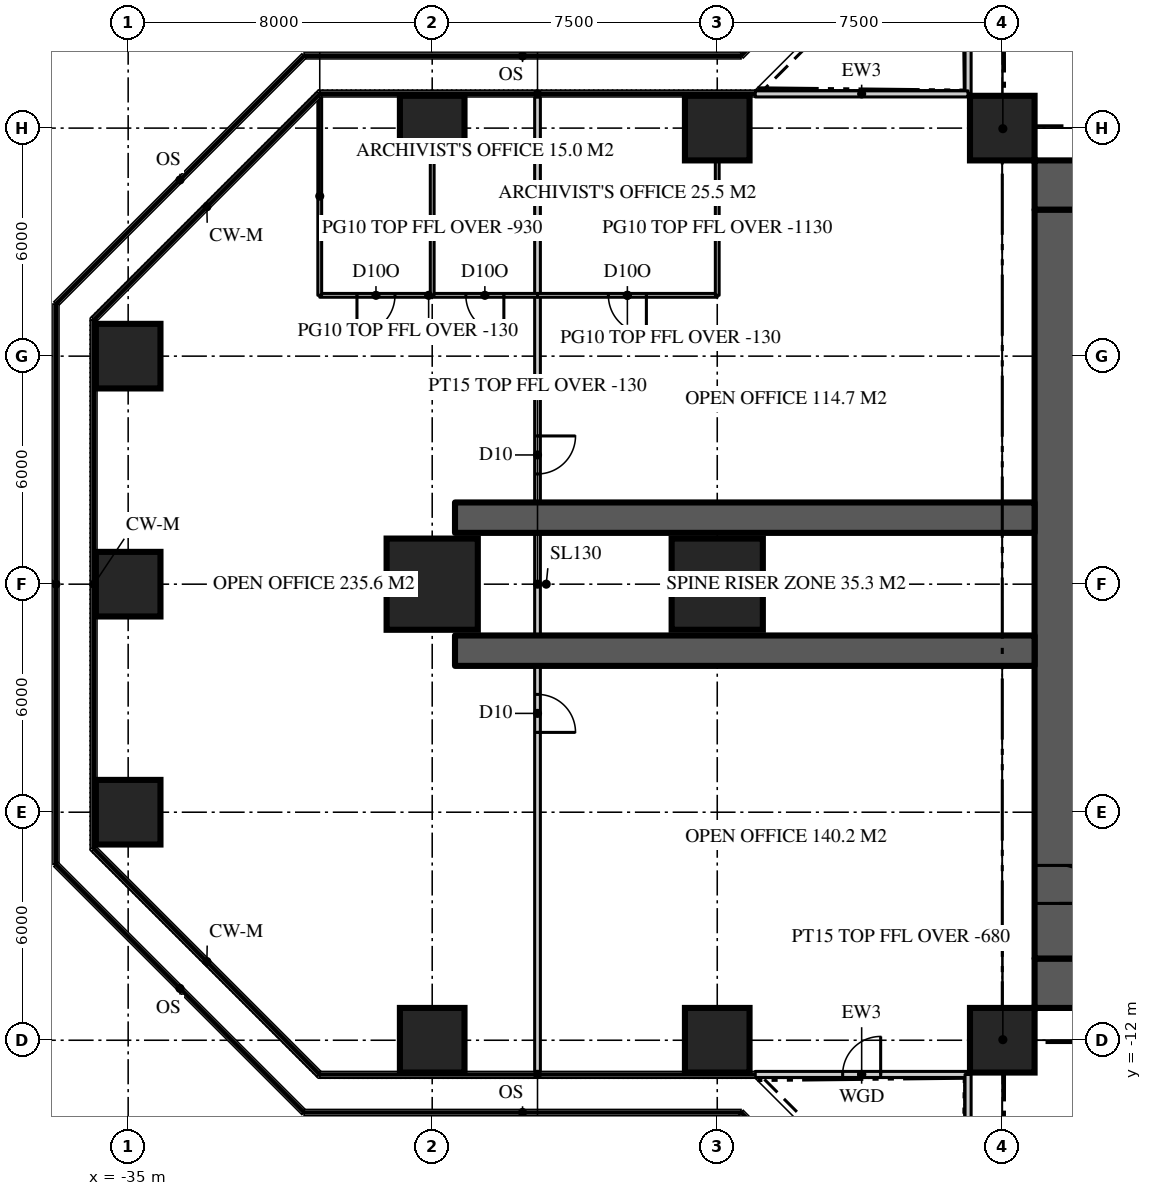
"""IFC4 building model, lengths in metres.
Left out: names, types, materials, properties, quantities, classifications, styles, units other than length and angle.
Written with IfcOpenShell. Run it as: python <this file> out.ifc"""

import sys

from ifc_helpers import new_model, si_unit, direction, frame, frame_2d, origin, origin_2d, place, context, subcontext, project, spatial, rectangle, extrude, element, fill, save


model = new_model("IFC4")
c1 = context("Model", 3, precision=1e-05, world=origin(), true_north=direction((0.0, 1.0)))
c2 = subcontext(c1, "Body", "Model", "MODEL_VIEW")
j1 = project(units=[si_unit("LENGTHUNIT", "METRE"), si_unit("PLANEANGLEUNIT", "RADIAN")], contexts=[c1])
p1 = place(None, origin())
s1 = spatial("IfcSite", under=j1, at=p1, CompositionType="ELEMENT")
p2 = place(p1, origin())
s2 = spatial("IfcBuilding", under=s1, at=p2, CompositionType="ELEMENT")
p3 = place(p2, frame((0.0, 0.0, 167.1)))
s3 = spatial("IfcBuildingStorey", under=s2, at=p3, CompositionType="ELEMENT", Elevation=167.1)
p4 = place(p3, frame((-11.15, 10.5, 0.0), z_axis=(0.0, 0.0, 1.0), x_axis=(1.0, 0.0, 0.0)))
e1 = element("IfcWall", 1, at=p4, inside=s3, PredefinedType="SHEAR", context=c2, shape_type="SweptSolid", body=[
    extrude(rectangle(XDim=22.3, YDim=1.3, at=frame_2d((11.15, 0.0))), origin(), (0.0, 0.0, 1.0), 3.9),
])
p5 = place(p4, frame((4.25, 0.0, 0.0)))
e2 = element("IfcOpeningElement", 2, at=p5, cuts=e1, PredefinedType="OPENING", context=c2, shape_type="SweptSolid", body=[
    extrude(rectangle(XDim=1.8, YDim=2.2, at=frame_2d((0.9, 1.1))), frame((0.0, 0.66, 0.0), z_axis=(0.0, -1.0, 0.0), x_axis=(1.0, 0.0, 0.0)), (0.0, 0.0, 1.0), 1.32),
])
p6 = place(p4, frame((16.25, 0.0, 0.0)))
e3 = element("IfcOpeningElement", 3, at=p6, cuts=e1, PredefinedType="OPENING", context=c2, shape_type="SweptSolid", body=[
    extrude(rectangle(XDim=1.8, YDim=2.2, at=frame_2d((0.9, 1.1))), frame((0.0, 0.66, 0.0), z_axis=(0.0, -1.0, 0.0), x_axis=(1.0, 0.0, 0.0)), (0.0, 0.0, 1.0), 1.32),
])
p7 = place(p3, frame((11.15, -10.5, 0.0), z_axis=(0.0, 0.0, 1.0), x_axis=(-1.0, 0.0, 0.0)))
e4 = element("IfcWall", 4, at=p7, inside=s3, PredefinedType="SHEAR", context=c2, shape_type="SweptSolid", body=[
    extrude(rectangle(XDim=22.3, YDim=1.3, at=frame_2d((11.15, 0.0))), origin(), (0.0, 0.0, 1.0), 3.9),
])
p8 = place(p7, frame((16.25, 0.0, 0.0)))
e5 = element("IfcOpeningElement", 5, at=p8, cuts=e4, PredefinedType="OPENING", context=c2, shape_type="SweptSolid", body=[
    extrude(rectangle(XDim=1.8, YDim=2.2, at=frame_2d((0.9, 1.1))), frame((0.0, 0.66, 0.0), z_axis=(0.0, -1.0, 0.0), x_axis=(1.0, 0.0, 0.0)), (0.0, 0.0, 1.0), 1.32),
])
p9 = place(p7, frame((4.25, 0.0, 0.0)))
e6 = element("IfcOpeningElement", 6, at=p9, cuts=e4, PredefinedType="OPENING", context=c2, shape_type="SweptSolid", body=[
    extrude(rectangle(XDim=1.8, YDim=2.2, at=frame_2d((0.9, 1.1))), frame((0.0, 0.66, 0.0), z_axis=(0.0, -1.0, 0.0), x_axis=(1.0, 0.0, 0.0)), (0.0, 0.0, 1.0), 1.32),
])
p10 = place(p3, frame((-10.5, 9.85, 0.0), z_axis=(0.0, 0.0, 1.0), x_axis=(0.0, -1.0, 0.0)))
e7 = element("IfcWall", 7, at=p10, inside=s3, PredefinedType="SHEAR", context=c2, shape_type="SweptSolid", body=[
    extrude(rectangle(XDim=19.7, YDim=1.3, at=frame_2d((9.85, 0.0))), origin(), (0.0, 0.0, 1.0), 3.9),
])
p11 = place(p10, frame((17.25, 0.0, 0.0)))
e8 = element("IfcOpeningElement", 8, at=p11, cuts=e7, PredefinedType="OPENING", context=c2, shape_type="SweptSolid", body=[
    extrude(rectangle(XDim=1.0, YDim=2.2, at=frame_2d((0.5, 1.1))), frame((0.0, 0.66, 0.0), z_axis=(0.0, -1.0, 0.0), x_axis=(1.0, 0.0, 0.0)), (0.0, 0.0, 1.0), 1.32),
])
for number, where, z_axis, x_axis in (
    (9, (-11.15, 1.75, 0.0), (0.0, 0.0, 1.0), (-1.0, 0.0, 0.0)),
    (10, (-11.15, -1.75, 0.0), (0.0, 0.0, 1.0), (-1.0, 0.0, 0.0)),
):
    element("IfcWall", number, at=place(p3, frame(where, z_axis=z_axis, x_axis=x_axis)), inside=s3, PredefinedType="SHEAR", context=c2, shape_type="SweptSolid", body=[
        extrude(rectangle(XDim=15.25, YDim=0.8, at=frame_2d((7.625, 0.0))), origin(), (0.0, 0.0, 1.0), 3.9),
    ])
for number, where, z_axis, x_axis in (
    (11, (-27.0, -12.0, 0.0), (0.0, 0.0, 1.0), (1.0, 0.0, 0.0)),
    (12, (-19.5, -12.0, 0.0), (0.0, 0.0, 1.0), (1.0, 0.0, 0.0)),
    (13, (-12.0, -12.0, 0.0), (0.0, 0.0, 1.0), (1.0, 0.0, 0.0)),
    (14, (-35.0, -6.0, 0.0), (0.0, 0.0, 1.0), (1.0, 0.0, 0.0)),
    (15, (-35.0, 0.0, 0.0), (0.0, 0.0, 1.0), (1.0, 0.0, 0.0)),
):
    element("IfcColumn", number, at=place(p3, frame(where, z_axis=z_axis, x_axis=x_axis)), inside=s3, PredefinedType="COLUMN", context=c2, shape_type="SweptSolid", body=[
        extrude(rectangle(XDim=1.7, YDim=1.7, at=origin_2d()), origin(), (0.0, 0.0, 1.0), 3.9),
    ])
for number, where, z_axis, x_axis in (
    (16, (-27.0, 0.0, 0.0), (0.0, 0.0, 1.0), (1.0, 0.0, 0.0)),
    (17, (-19.5, 0.0, 0.0), (0.0, 0.0, 1.0), (1.0, 0.0, 0.0)),
):
    element("IfcColumn", number, at=place(p3, frame(where, z_axis=z_axis, x_axis=x_axis)), inside=s3, PredefinedType="COLUMN", context=c2, shape_type="SweptSolid", body=[
        extrude(rectangle(XDim=2.4, YDim=2.4, at=origin_2d()), origin(), (0.0, 0.0, 1.0), 3.9),
    ])
for number, where, z_axis, x_axis in (
    (18, (-35.0, 6.0, 0.0), (0.0, 0.0, 1.0), (1.0, 0.0, 0.0)),
    (19, (-27.0, 12.0, 0.0), (0.0, 0.0, 1.0), (1.0, 0.0, 0.0)),
    (20, (-19.5, 12.0, 0.0), (0.0, 0.0, 1.0), (1.0, 0.0, 0.0)),
    (21, (-12.0, 12.0, 0.0), (0.0, 0.0, 1.0), (1.0, 0.0, 0.0)),
):
    element("IfcColumn", number, at=place(p3, frame(where, z_axis=z_axis, x_axis=x_axis)), inside=s3, PredefinedType="COLUMN", context=c2, shape_type="SweptSolid", body=[
        extrude(rectangle(XDim=1.7, YDim=1.7, at=origin_2d()), origin(), (0.0, 0.0, 1.0), 3.9),
    ])
p12 = place(p3, frame((-12.9, 18.5, 0.0), z_axis=(0.0, 0.0, 1.0), x_axis=(0.0, -1.0, 0.0)))
e22 = element("IfcWall", 22, at=p12, inside=s3, PredefinedType="SOLIDWALL", context=c2, shape_type="SweptSolid", body=[
    extrude(rectangle(XDim=5.6, YDim=0.16, at=frame_2d((2.8, 0.0))), origin(), (0.0, 0.0, 1.0), 3.77),
])
p13 = place(p12, frame((2.3, 0.0, 0.0)))
e23 = element("IfcOpeningElement", 23, at=p13, cuts=e22, PredefinedType="OPENING", context=c2, shape_type="SweptSolid", body=[
    extrude(rectangle(XDim=1.0, YDim=2.2, at=frame_2d((0.5, 1.1))), frame((0.0, 0.09, 0.0), z_axis=(0.0, -1.0, 0.0), x_axis=(1.0, 0.0, 0.0)), (0.0, 0.0, 1.0), 0.18),
])
p14 = place(p3, frame((-12.9, 12.9, 0.0), z_axis=(0.0, 0.0, 1.0), x_axis=(-1.0, 0.0, 0.0)))
e24 = element("IfcWall", 24, at=p14, inside=s3, PredefinedType="SOLIDWALL", context=c2, shape_type="SweptSolid", body=[
    extrude(rectangle(XDim=5.6, YDim=0.16, at=frame_2d((2.8, 0.0))), origin(), (0.0, 0.0, 1.0), 3.77),
])
p15 = place(p3, frame((-18.5, -12.9, 0.0), z_axis=(0.0, 0.0, 1.0), x_axis=(1.0, 0.0, 0.0)))
e25 = element("IfcWall", 25, at=p15, inside=s3, PredefinedType="SOLIDWALL", context=c2, shape_type="SweptSolid", body=[
    extrude(rectangle(XDim=5.6, YDim=0.16, at=frame_2d((2.8, 0.0))), origin(), (0.0, 0.0, 1.0), 3.77),
])
p16 = place(p15, frame((2.3, 0.0, 0.0)))
e26 = element("IfcOpeningElement", 26, at=p16, cuts=e25, PredefinedType="OPENING", context=c2, shape_type="SweptSolid", body=[
    extrude(rectangle(XDim=1.0, YDim=2.2, at=frame_2d((0.5, 1.1))), frame((0.0, 0.09, 0.0), z_axis=(0.0, -1.0, 0.0), x_axis=(1.0, 0.0, 0.0)), (0.0, 0.0, 1.0), 0.18),
])
p17 = place(p3, frame((-12.9, -12.9, 0.0), z_axis=(0.0, 0.0, 1.0), x_axis=(0.0, -1.0, 0.0)))
e27 = element("IfcWall", 27, at=p17, inside=s3, PredefinedType="SOLIDWALL", context=c2, shape_type="SweptSolid", body=[
    extrude(rectangle(XDim=5.6, YDim=0.16, at=frame_2d((2.8, 0.0))), origin(), (0.0, 0.0, 1.0), 3.77),
])
p18 = place(p3, frame((-24.229, 12.82, 0.0), z_axis=(0.0, 0.0, 1.0), x_axis=(0.0, -1.0, 0.0)))
e28 = element("IfcWall", 28, at=p18, inside=s3, PredefinedType="PARTITIONING", context=c2, shape_type="SweptSolid", body=[
    extrude(rectangle(XDim=25.64, YDim=0.15, at=frame_2d((12.82, 0.0))), origin(), (0.0, 0.0, 1.0), 3.77),
])
p19 = place(p18, frame((15.72, 0.0, 0.0)))
e29 = element("IfcOpeningElement", 29, at=p19, cuts=e28, PredefinedType="OPENING", context=c2, shape_type="SweptSolid", body=[
    extrude(rectangle(XDim=1.0, YDim=2.2, at=frame_2d((0.5, 1.1))), frame((0.0, 0.085, 0.0), z_axis=(0.0, -1.0, 0.0), x_axis=(1.0, 0.0, 0.0)), (0.0, 0.0, 1.0), 0.17),
])
p20 = place(p18, frame((8.92, 0.0, 0.0)))
e30 = element("IfcOpeningElement", 30, at=p20, cuts=e28, PredefinedType="OPENING", context=c2, shape_type="SweptSolid", body=[
    extrude(rectangle(XDim=1.0, YDim=2.2, at=frame_2d((0.5, 1.1))), frame((0.0, 0.085, 0.0), z_axis=(0.0, -1.0, 0.0), x_axis=(1.0, 0.0, 0.0)), (0.0, 0.0, 1.0), 0.17),
])
p21 = place(p3, frame((-19.5, 7.6, 0.0), z_axis=(0.0, 0.0, 1.0), x_axis=(-1.0, 0.0, 0.0)))
e31 = element("IfcWall", 31, at=p21, inside=s3, PredefinedType="PARTITIONING", context=c2, shape_type="SweptSolid", body=[
    extrude(rectangle(XDim=4.729, YDim=0.1, at=frame_2d((2.365, 0.0))), origin(), (0.0, 0.0, 1.0), 3.77),
])
p22 = place(p21, frame((1.865, 0.0, 0.0)))
e32 = element("IfcOpeningElement", 32, at=p22, cuts=e31, PredefinedType="OPENING", context=c2, shape_type="SweptSolid", body=[
    extrude(rectangle(XDim=1.0, YDim=2.2, at=frame_2d((0.5, 1.1))), frame((0.0, 0.06, 0.0), z_axis=(0.0, -1.0, 0.0), x_axis=(1.0, 0.0, 0.0)), (0.0, 0.0, 1.0), 0.12),
])
p23 = place(p3, frame((-24.229, 7.6, 0.0), z_axis=(0.0, 0.0, 1.0), x_axis=(-1.0, 0.0, 0.0)))
e33 = element("IfcWall", 33, at=p23, inside=s3, PredefinedType="PARTITIONING", context=c2, shape_type="SweptSolid", body=[
    extrude(rectangle(XDim=5.73, YDim=0.1, at=frame_2d((2.865, 0.0))), origin(), (0.0, 0.0, 1.0), 3.77),
])
p24 = place(p23, frame((0.885, 0.0, 0.0)))
e34 = element("IfcOpeningElement", 34, at=p24, cuts=e33, PredefinedType="OPENING", context=c2, shape_type="SweptSolid", body=[
    extrude(rectangle(XDim=1.0, YDim=2.2, at=frame_2d((0.5, 1.1))), frame((0.0, 0.06, 0.0), z_axis=(0.0, -1.0, 0.0), x_axis=(1.0, 0.0, 0.0)), (0.0, 0.0, 1.0), 0.12),
])
p25 = place(p23, frame((3.75, 0.0, 0.0)))
e35 = element("IfcOpeningElement", 35, at=p25, cuts=e33, PredefinedType="OPENING", context=c2, shape_type="SweptSolid", body=[
    extrude(rectangle(XDim=1.0, YDim=2.2, at=frame_2d((0.5, 1.1))), frame((0.0, 0.06, 0.0), z_axis=(0.0, -1.0, 0.0), x_axis=(1.0, 0.0, 0.0)), (0.0, 0.0, 1.0), 0.12),
])
p26 = place(p3, frame((-19.5, 7.6, 0.0), z_axis=(0.0, 0.0, 1.0), x_axis=(0.0, 1.0, 0.0)))
e36 = element("IfcWall", 36, at=p26, inside=s3, PredefinedType="PARTITIONING", context=c2, shape_type="SweptSolid", body=[
    extrude(rectangle(XDim=3.55, YDim=0.1, at=frame_2d((1.775, 0.0))), origin(), (0.0, 0.0, 1.0), 2.77),
])
p27 = place(p3, frame((-27.0, 7.6, 0.0), z_axis=(0.0, 0.0, 1.0), x_axis=(0.0, 1.0, 0.0)))
e37 = element("IfcWall", 37, at=p27, inside=s3, PredefinedType="PARTITIONING", context=c2, shape_type="SweptSolid", body=[
    extrude(rectangle(XDim=3.55, YDim=0.1, at=frame_2d((1.775, 0.0))), origin(), (0.0, 0.0, 1.0), 2.97),
])
p28 = place(p3, frame((-29.959, 7.6, 0.0), z_axis=(0.0, 0.0, 1.0), x_axis=(0.0, 1.0, 0.0)))
e38 = element("IfcWall", 38, at=p28, inside=s3, PredefinedType="PARTITIONING", context=c2, shape_type="SweptSolid", body=[
    extrude(rectangle(XDim=5.22, YDim=0.1, at=frame_2d((2.61, 0.0))), origin(), (0.0, 0.0, 1.0), 3.77),
])
for number, where, z_axis, x_axis in (
    (39, (-11.15, 11.15, 0.0), (0.0, 0.0, 1.0), (-0.707, 0.707, 0.0)),
    (40, (-11.15, -11.15, 0.0), (0.0, 0.0, 1.0), (-0.707, -0.707, 0.0)),
):
    element("IfcWall", number, at=place(p3, frame(where, z_axis=z_axis, x_axis=x_axis)), inside=s3, PredefinedType="PARTITIONING", context=c2, shape_type="SweptSolid", body=[
        extrude(rectangle(XDim=2.362, YDim=0.15, at=frame_2d((1.181, 0.0))), origin(), (0.0, 0.0, 1.0), 3.22),
    ])
p29 = place(p16, origin())
e41 = element("IfcDoor", 41, at=p29, inside=s3, OperationType="SINGLE_SWING_RIGHT", PredefinedType="DOOR", context=c2, shape_type="SweptSolid", body=[
    extrude(rectangle(XDim=1.0, YDim=2.2, at=frame_2d((0.5, 1.1))), frame((0.0, 0.025, 0.0), z_axis=(0.0, -1.0, 0.0), x_axis=(1.0, 0.0, 0.0)), (0.0, 0.0, 1.0), 0.05),
])
fill(e26, e41)
p30 = place(p11, origin())
e42 = element("IfcDoor", 42, at=p30, inside=s3, OperationType="SINGLE_SWING_RIGHT", PredefinedType="DOOR", context=c2, shape_type="SweptSolid", body=[
    extrude(rectangle(XDim=1.0, YDim=2.2, at=frame_2d((0.5, 1.1))), frame((0.0, 0.025, 0.0), z_axis=(0.0, -1.0, 0.0), x_axis=(1.0, 0.0, 0.0)), (0.0, 0.0, 1.0), 0.05),
])
fill(e8, e42)
p31 = place(p19, origin())
e43 = element("IfcDoor", 43, at=p31, inside=s3, OperationType="SINGLE_SWING_RIGHT", PredefinedType="DOOR", context=c2, shape_type="SweptSolid", body=[
    extrude(rectangle(XDim=1.0, YDim=2.2, at=frame_2d((0.5, 1.1))), frame((0.0, 0.025, 0.0), z_axis=(0.0, -1.0, 0.0), x_axis=(1.0, 0.0, 0.0)), (0.0, 0.0, 1.0), 0.05),
])
fill(e29, e43)
p32 = place(p20, origin())
e44 = element("IfcDoor", 44, at=p32, inside=s3, OperationType="SINGLE_SWING_LEFT", PredefinedType="DOOR", context=c2, shape_type="SweptSolid", body=[
    extrude(rectangle(XDim=1.0, YDim=2.2, at=frame_2d((0.5, 1.1))), frame((0.0, 0.025, 0.0), z_axis=(0.0, -1.0, 0.0), x_axis=(1.0, 0.0, 0.0)), (0.0, 0.0, 1.0), 0.05),
])
fill(e30, e44)
p33 = place(p22, origin())
e45 = element("IfcDoor", 45, at=p33, inside=s3, OperationType="SINGLE_SWING_LEFT", PredefinedType="DOOR", context=c2, shape_type="SweptSolid", body=[
    extrude(rectangle(XDim=1.0, YDim=2.2, at=frame_2d((0.5, 1.1))), frame((0.0, 0.025, 0.0), z_axis=(0.0, -1.0, 0.0), x_axis=(1.0, 0.0, 0.0)), (0.0, 0.0, 1.0), 0.05),
])
fill(e32, e45)
p34 = place(p24, origin())
e46 = element("IfcDoor", 46, at=p34, inside=s3, OperationType="SINGLE_SWING_LEFT", PredefinedType="DOOR", context=c2, shape_type="SweptSolid", body=[
    extrude(rectangle(XDim=1.0, YDim=2.2, at=frame_2d((0.5, 1.1))), frame((0.0, 0.025, 0.0), z_axis=(0.0, -1.0, 0.0), x_axis=(1.0, 0.0, 0.0)), (0.0, 0.0, 1.0), 0.05),
])
fill(e34, e46)
p35 = place(p25, origin())
e47 = element("IfcDoor", 47, at=p35, inside=s3, OperationType="SINGLE_SWING_RIGHT", PredefinedType="DOOR", context=c2, shape_type="SweptSolid", body=[
    extrude(rectangle(XDim=1.0, YDim=2.2, at=frame_2d((0.5, 1.1))), frame((0.0, 0.025, 0.0), z_axis=(0.0, -1.0, 0.0), x_axis=(1.0, 0.0, 0.0)), (0.0, 0.0, 1.0), 0.05),
])
fill(e35, e47)
save(model, sys.argv[1])
